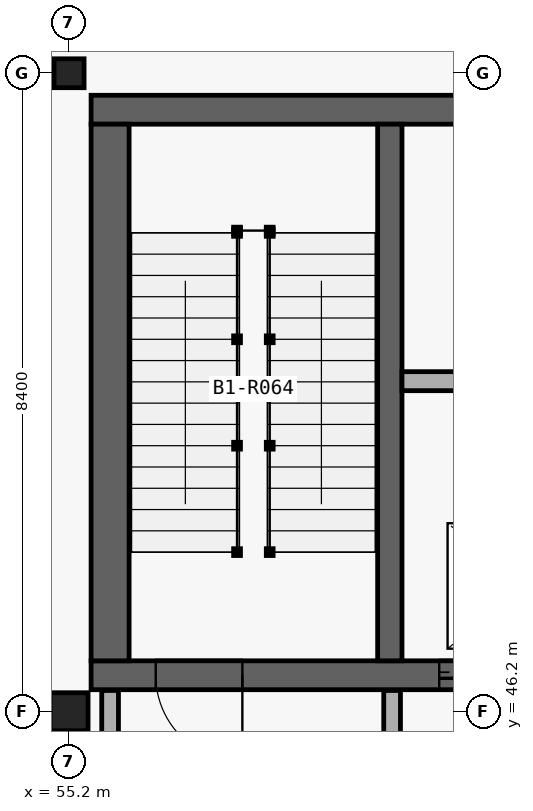
"""IFC4 building model, lengths in metres.
Left out: names, types, materials, properties, quantities, classifications, styles, units other than length and angle.
Written with IfcOpenShell. Run it as: python <this file> out.ifc"""

import sys

from ifc_helpers import new_model, si_unit, direction, frame, frame_2d, origin_with_axes, origin_2d_with_axis, place, context, subcontext, project, spatial, rectangle, i_section, extrude, element, fill, save


model = new_model("IFC4")
c1 = context("Model", 3, precision=1e-05, world=origin_with_axes(), true_north=direction((0.0, 1.0)))
c2 = subcontext(c1, "Body", "Model", "MODEL_VIEW")
j1 = project(units=[si_unit("LENGTHUNIT", "METRE"), si_unit("PLANEANGLEUNIT", "RADIAN")], contexts=[c1])
p1 = place(None, origin_with_axes())
s1 = spatial("IfcSite", under=j1, at=p1, CompositionType="ELEMENT")
p2 = place(p1, origin_with_axes())
s2 = spatial("IfcBuilding", under=s1, at=p2, CompositionType="ELEMENT")
p3 = place(p2, frame((0.0, 0.0, -4.8), z_axis=(0.0, 0.0, 1.0), x_axis=(1.0, 0.0, 0.0)))
s3 = spatial("IfcBuildingStorey", under=s2, at=p3, CompositionType="ELEMENT", Elevation=-4.8)
p4 = place(None, frame((55.49, 46.68, -5.35), z_axis=(0.0, 0.0, 1.0), x_axis=(1.0, 0.0, 0.0)))
e1 = element("IfcWall", 1, at=p4, inside=s3, PredefinedType="SHEAR", context=c2, shape_type="SweptSolid", body=[
    extrude(rectangle(XDim=7.82, YDim=0.38, at=frame_2d((3.91, 0.0), x_axis=(1.0, 0.0))), origin_with_axes(), (0.0, 0.0, 1.0), 5.35),
])
p5 = place(None, frame((56.91, 46.68, -4.8), z_axis=(0.0, 0.0, 1.0), x_axis=(1.0, 0.0, 0.0)))
e2 = element("IfcOpeningElement", 2, at=p5, cuts=e1, PredefinedType="OPENING", context=c2, shape_type="SweptSolid", body=[
    extrude(rectangle(XDim=1.14, YDim=2.18, at=frame_2d((0.0, 1.09), x_axis=(1.0, 0.0))), frame((0.0, 0.2, 0.0), z_axis=(0.0, -1.0, 0.0), x_axis=(1.0, 0.0, 0.0)), (0.0, 0.0, 1.0), 0.4),
])
p6 = place(None, frame((60.65, 46.68, -4.8), z_axis=(0.0, 0.0, 1.0), x_axis=(1.0, 0.0, 0.0)))
e3 = element("IfcOpeningElement", 3, at=p6, cuts=e1, PredefinedType="OPENING", context=c2, shape_type="SweptSolid", body=[
    extrude(rectangle(XDim=1.16, YDim=2.2, at=frame_2d((0.0, 1.1), x_axis=(1.0, 0.0))), frame((0.0, 0.2, 0.0), z_axis=(0.0, -1.0, 0.0), x_axis=(1.0, 0.0, 0.0)), (0.0, 0.0, 1.0), 0.4),
])
p7 = place(None, frame((63.31, 54.12, -5.35), z_axis=(0.0, 0.0, 1.0), x_axis=(-1.0, 0.0, 0.0)))
e4 = element("IfcWall", 4, at=p7, inside=s3, PredefinedType="SHEAR", context=c2, shape_type="SweptSolid", body=[
    extrude(rectangle(XDim=7.82, YDim=0.38, at=frame_2d((3.91, 0.0), x_axis=(1.0, 0.0))), origin_with_axes(), (0.0, 0.0, 1.0), 5.35),
])
p8 = place(None, frame((55.74, 53.93, -5.35), z_axis=(0.0, 0.0, 1.0), x_axis=(0.0, -1.0, 0.0)))
e5 = element("IfcWall", 5, at=p8, inside=s3, PredefinedType="SHEAR", context=c2, shape_type="SweptSolid", body=[
    extrude(rectangle(XDim=7.06, YDim=0.5, at=frame_2d((3.53, 0.0), x_axis=(1.0, 0.0))), origin_with_axes(), (0.0, 0.0, 1.0), 5.35),
])
p9 = place(None, frame((59.42, 46.87, -5.35), z_axis=(0.0, 0.0, 1.0), x_axis=(0.0, 1.0, 0.0)))
e6 = element("IfcWall", 6, at=p9, inside=s3, PredefinedType="SHEAR", context=c2, shape_type="SweptSolid", body=[
    extrude(rectangle(XDim=7.06, YDim=0.32, at=frame_2d((3.53, 0.0), x_axis=(1.0, 0.0))), origin_with_axes(), (0.0, 0.0, 1.0), 5.35),
])
p10 = place(None, frame((59.58, 50.549, -4.8), z_axis=(0.0, 0.0, 1.0), x_axis=(1.0, 0.0, 0.0)))
e7 = element("IfcWall", 7, at=p10, inside=s3, PredefinedType="PARTITIONING", context=c2, shape_type="SweptSolid", body=[
    extrude(rectangle(XDim=3.23, YDim=0.25, at=frame_2d((1.615, 0.0), x_axis=(1.0, 0.0))), origin_with_axes(), (0.0, 0.0, 1.0), 4.44),
])
for number, where, z_axis, x_axis in (
    (8, (55.74, 45.22, -4.8), (0.0, 0.0, 1.0), (0.0, 1.0, 0.0)),
    (9, (59.45, 45.22, -4.8), (0.0, 0.0, 1.0), (0.0, 1.0, 0.0)),
):
    element("IfcWall", number, at=place(None, frame(where, z_axis=z_axis, x_axis=x_axis)), inside=s3, PredefinedType="PARTITIONING", context=c2, shape_type="SweptSolid", body=[
        extrude(rectangle(XDim=1.26, YDim=0.22, at=frame_2d((0.63, 0.0), x_axis=(1.0, 0.0))), origin_with_axes(), (0.0, 0.0, 1.0), 4.44),
    ])
p11 = place(None, frame((55.2, 46.2, -5.35), z_axis=(0.0, 0.0, 1.0), x_axis=(1.0, 0.0, 0.0)))
e10 = element("IfcColumn", 10, at=p11, inside=s3, PredefinedType="COLUMN", context=c2, shape_type="SweptSolid", body=[
    extrude(i_section(OverallWidth=0.5, OverallDepth=0.5, WebThickness=0.022, FlangeThickness=0.036, at=origin_2d_with_axis()), origin_with_axes(), (0.0, 0.0, 1.0), 5.35),
])
p12 = place(None, frame((55.2, 54.6, -5.35), z_axis=(0.0, 0.0, 1.0), x_axis=(1.0, 0.0, 0.0)))
e11 = element("IfcColumn", 11, at=p12, inside=s3, PredefinedType="COLUMN", context=c2, shape_type="SweptSolid", body=[
    extrude(i_section(OverallWidth=0.395, OverallDepth=0.38, WebThickness=0.019, FlangeThickness=0.03, at=origin_2d_with_axis()), origin_with_axes(), (0.0, 0.0, 1.0), 5.35),
])
p13 = place(None, frame((56.91, 46.68, -4.8), z_axis=(0.0, 0.0, 1.0), x_axis=(-1.0, 0.0, 0.0)))
e12 = element("IfcDoor", 12, at=p13, inside=s3, OperationType="SINGLE_SWING_RIGHT", PredefinedType="DOOR", context=c2, shape_type="SweptSolid", body=[
    extrude(rectangle(XDim=1.14, YDim=2.18, at=frame_2d((0.0, 1.09), x_axis=(1.0, 0.0))), frame((0.0, 0.04, 0.0), z_axis=(0.0, -1.0, 0.0), x_axis=(1.0, 0.0, 0.0)), (0.0, 0.0, 1.0), 0.08),
])
fill(e2, e12)
p14 = place(None, frame((60.65, 46.68, -4.8), z_axis=(0.0, 0.0, 1.0), x_axis=(-1.0, 0.0, 0.0)))
e13 = element("IfcDoor", 13, at=p14, inside=s3, OperationType="SLIDING_TO_LEFT", PredefinedType="DOOR", context=c2, shape_type="SweptSolid", body=[
    extrude(rectangle(XDim=1.16, YDim=2.2, at=frame_2d((0.0, 1.1), x_axis=(1.0, 0.0))), frame((0.0, 0.04, 0.0), z_axis=(0.0, -1.0, 0.0), x_axis=(1.0, 0.0, 0.0)), (0.0, 0.0, 1.0), 0.08),
])
fill(e3, e13)
save(model, sys.argv[1])
